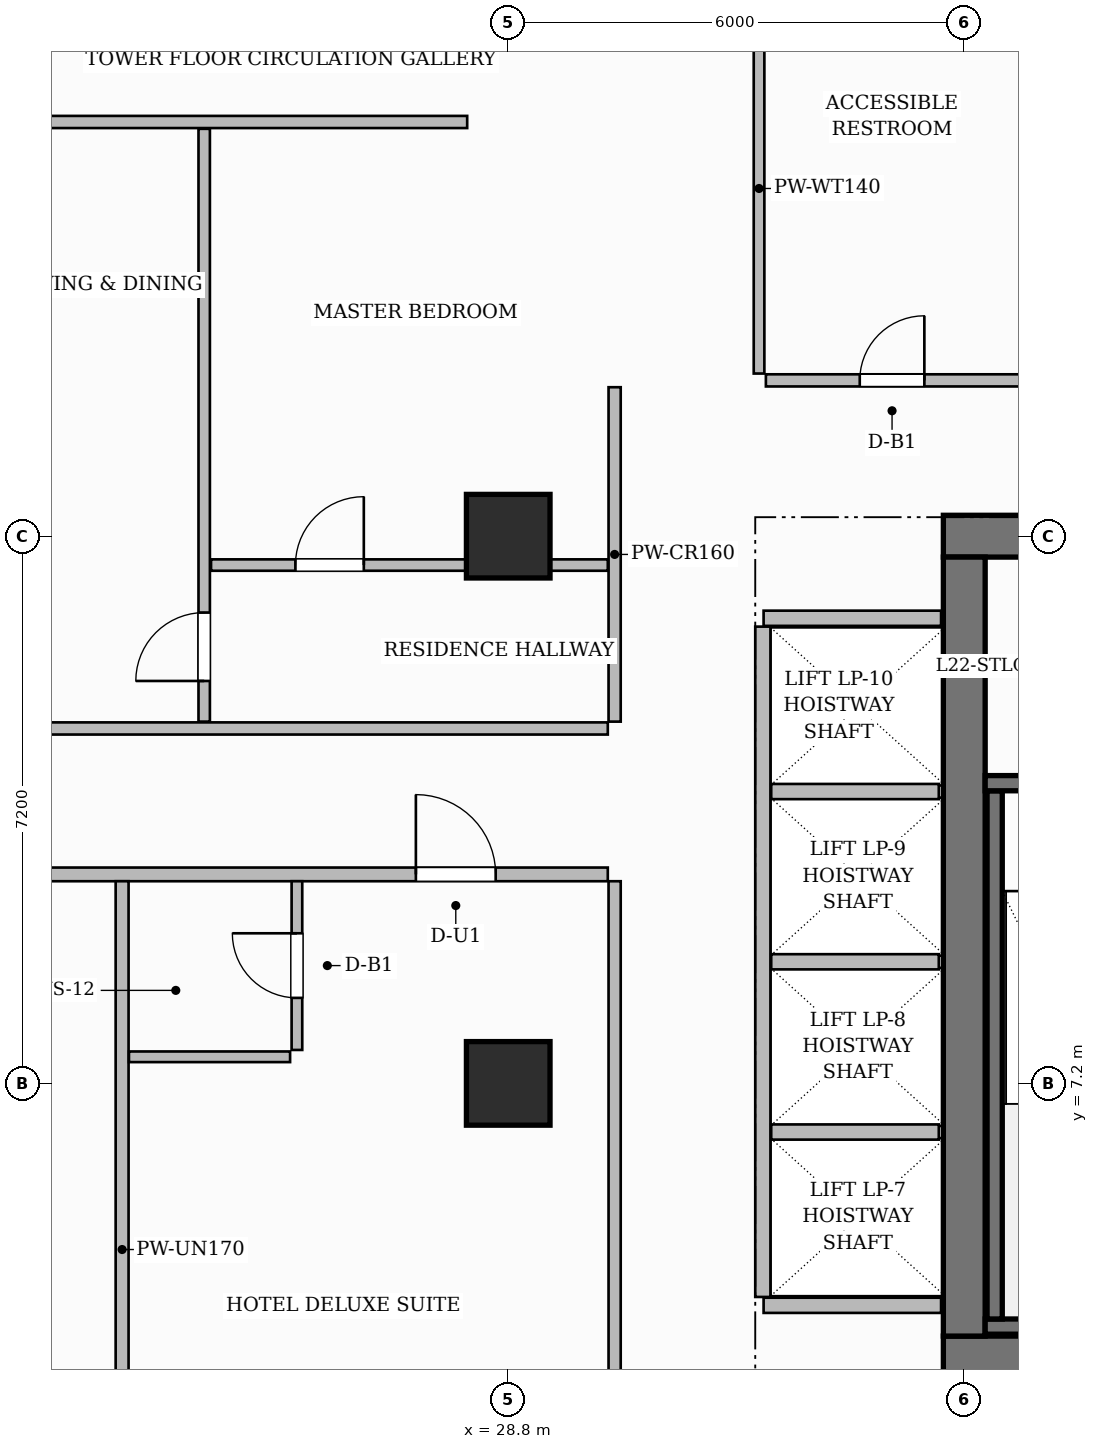
"""IFC4 building model, lengths in metres.
Left out: names, types, materials, properties, quantities, classifications, styles, units other than length and angle.
Written with IfcOpenShell. Run it as: python <this file> out.ifc"""

import sys

from ifc_helpers import new_model, si_unit, direction, frame, frame_2d, origin, origin_2d, place, context, subcontext, project, spatial, rectangle, extrude, source, transform, mapped, element, fill, save


model = new_model("IFC4")
c1 = context("Model", 3, precision=1e-05, world=origin(), true_north=direction((0.0, 1.0)))
c2 = subcontext(c1, "Body", "Model", "MODEL_VIEW")
j1 = project(units=[si_unit("LENGTHUNIT", "METRE"), si_unit("PLANEANGLEUNIT", "RADIAN")], contexts=[c1])
p1 = place(None, origin())
s1 = spatial("IfcSite", under=j1, at=p1, CompositionType="ELEMENT")
p2 = place(p1, origin())
s2 = spatial("IfcBuilding", under=s1, at=p2, CompositionType="ELEMENT")
p3 = place(p2, frame((0.0, 0.0, 91.6)))
s3 = spatial("IfcBuildingStorey", under=s2, at=p3, CompositionType="ELEMENT", Elevation=91.6)
p4 = place(p3, frame((34.525, 3.6, 0.0), z_axis=(0.0, 0.0, 1.0), x_axis=(1.0, 0.0, 0.0)))
e1 = element("IfcWall", 1, at=p4, inside=s3, PredefinedType="SHEAR", context=c2, shape_type="SweptSolid", body=[
    extrude(rectangle(XDim=15.55, YDim=0.55, at=frame_2d((7.775, 0.0))), origin(), (0.0, 0.0, 1.0), 3.7),
])
p5 = place(p4, frame((4.475, 0.0, 0.0)))
e2 = element("IfcOpeningElement", 2, at=p5, cuts=e1, PredefinedType="OPENING", context=c2, shape_type="SweptSolid", body=[
    extrude(rectangle(XDim=0.9, YDim=2.1, at=frame_2d((0.45, 1.05))), frame((0.0, 0.285, 0.0), z_axis=(0.0, -1.0, 0.0), x_axis=(1.0, 0.0, 0.0)), (0.0, 0.0, 1.0), 0.57),
])
p6 = place(p4, frame((6.925, 0.0, 0.0)))
e3 = element("IfcOpeningElement", 3, at=p6, cuts=e1, PredefinedType="OPENING", context=c2, shape_type="SweptSolid", body=[
    extrude(rectangle(XDim=0.9, YDim=2.1, at=frame_2d((0.45, 1.05))), frame((0.0, 0.285, 0.0), z_axis=(0.0, -1.0, 0.0), x_axis=(1.0, 0.0, 0.0)), (0.0, 0.0, 1.0), 0.57),
])
p7 = place(p3, frame((34.525, 14.4, 0.0), z_axis=(0.0, 0.0, 1.0), x_axis=(1.0, 0.0, 0.0)))
e4 = element("IfcWall", 4, at=p7, inside=s3, PredefinedType="SHEAR", context=c2, shape_type="SweptSolid", body=[
    extrude(rectangle(XDim=15.55, YDim=0.55, at=frame_2d((7.775, 0.0))), origin(), (0.0, 0.0, 1.0), 3.7),
])
p8 = place(p7, frame((5.405, 0.0, 0.0)))
e5 = element("IfcOpeningElement", 5, at=p8, cuts=e4, PredefinedType="OPENING", context=c2, shape_type="SweptSolid", body=[
    extrude(rectangle(XDim=1.5, YDim=2.2, at=frame_2d((0.75, 1.1))), frame((0.0, 0.285, 0.0), z_axis=(0.0, -1.0, 0.0), x_axis=(1.0, 0.0, 0.0)), (0.0, 0.0, 1.0), 0.57),
])
p9 = place(p7, frame((1.62, 0.0, 0.0)))
e6 = element("IfcOpeningElement", 6, at=p9, cuts=e4, PredefinedType="OPENING", context=c2, shape_type="SweptSolid", body=[
    extrude(rectangle(XDim=1.05, YDim=2.15, at=frame_2d((0.525, 1.075))), frame((0.0, 0.285, 0.0), z_axis=(0.0, -1.0, 0.0), x_axis=(1.0, 0.0, 0.0)), (0.0, 0.0, 1.0), 0.57),
])
p10 = place(p7, frame((11.25, 0.0, 0.0)))
e7 = element("IfcOpeningElement", 7, at=p10, cuts=e4, PredefinedType="OPENING", context=c2, shape_type="SweptSolid", body=[
    extrude(rectangle(XDim=1.05, YDim=2.15, at=frame_2d((0.525, 1.075))), frame((0.0, 0.285, 0.0), z_axis=(0.0, -1.0, 0.0), x_axis=(1.0, 0.0, 0.0)), (0.0, 0.0, 1.0), 0.57),
])
p11 = place(p3, frame((34.8, 3.875, 0.0), z_axis=(0.0, 0.0, 1.0), x_axis=(0.0, 1.0, 0.0)))
e8 = element("IfcWall", 8, at=p11, inside=s3, PredefinedType="SHEAR", context=c2, shape_type="SweptSolid", body=[
    extrude(rectangle(XDim=10.25, YDim=0.55, at=frame_2d((5.125, 0.0))), origin(), (0.0, 0.0, 1.0), 3.7),
])
m1 = source(origin(), c2, "Body", "SweptSolid", [
    extrude(rectangle(XDim=1.1, YDim=1.1, at=origin_2d()), origin(), (0.0, 0.0, 1.0), 3.7),
])
for number, where, z_axis, x_axis in (
    (9, (28.8, 7.2, 0.0), (0.0, 0.0, 1.0), (1.0, 0.0, 0.0)),
    (10, (28.8, 14.4, 0.0), (0.0, 0.0, 1.0), (1.0, 0.0, 0.0)),
):
    element("IfcColumn", number, at=place(p3, frame(where, z_axis=z_axis, x_axis=x_axis)), inside=s3, PredefinedType="COLUMN", context=c2, shape_type="MappedRepresentation", body=[
        mapped(m1, transform((0.0, 0.0, 0.0), scale=1.0)),
    ])
p12 = place(p3, frame((35.075, 4.0, 0.0), z_axis=(0.0, 0.0, 1.0), x_axis=(1.0, 0.0, 0.0)))
e11 = element("IfcWall", 11, at=p12, inside=s3, PredefinedType="SHEAR", context=c2, shape_type="SweptSolid", body=[
    extrude(rectangle(XDim=3.165, YDim=0.2, at=frame_2d((1.583, 0.0))), origin(), (0.0, 0.0, 1.0), 3.7),
])
p13 = place(p3, frame((35.2, 4.1, 0.0), z_axis=(0.0, 0.0, 1.0), x_axis=(0.0, 1.0, 0.0)))
e12 = element("IfcWall", 12, at=p13, inside=s3, PredefinedType="SHEAR", context=c2, shape_type="SweptSolid", body=[
    extrude(rectangle(XDim=6.95, YDim=0.2, at=frame_2d((3.475, 0.0))), origin(), (0.0, 0.0, 1.0), 3.7),
])
p14 = place(p3, frame((35.075, 11.15, 0.0), z_axis=(0.0, 0.0, 1.0), x_axis=(1.0, 0.0, 0.0)))
e13 = element("IfcWall", 13, at=p14, inside=s3, PredefinedType="SHEAR", context=c2, shape_type="SweptSolid", body=[
    extrude(rectangle(XDim=3.165, YDim=0.2, at=frame_2d((1.583, 0.0))), origin(), (0.0, 0.0, 1.0), 3.7),
])
p15 = place(p14, frame((1.07, 0.0, 0.0)))
e14 = element("IfcOpeningElement", 14, at=p15, cuts=e13, PredefinedType="OPENING", context=c2, shape_type="SweptSolid", body=[
    extrude(rectangle(XDim=1.05, YDim=2.2, at=frame_2d((0.525, 1.1))), frame((0.0, 0.11, 0.0), z_axis=(0.0, -1.0, 0.0), x_axis=(1.0, 0.0, 0.0)), (0.0, 0.0, 1.0), 0.22),
])
for number, where, z_axis, x_axis in (
    (15, (32.16, 4.28, 0.0), (0.0, 0.0, 1.0), (1.0, 0.0, 0.0)),
    (16, (32.16, 13.32, 0.0), (0.0, 0.0, 1.0), (1.0, 0.0, 0.0)),
):
    element("IfcWall", number, at=place(p3, frame(where, z_axis=z_axis, x_axis=x_axis)), inside=s3, PredefinedType="PARTITIONING", context=c2, shape_type="SweptSolid", body=[
        extrude(rectangle(XDim=2.335, YDim=0.2, at=frame_2d((1.167, 0.0))), origin(), (0.0, 0.0, 1.0), 3.45),
    ])
p16 = place(p3, frame((32.15, 4.39, 0.0), z_axis=(0.0, 0.0, 1.0), x_axis=(0.0, 1.0, 0.0)))
e17 = element("IfcWall", 17, at=p16, inside=s3, PredefinedType="PARTITIONING", context=c2, shape_type="SweptSolid", body=[
    extrude(rectangle(XDim=8.82, YDim=0.2, at=frame_2d((4.41, 0.0))), origin(), (0.0, 0.0, 1.0), 3.45),
])
for number, where, z_axis, x_axis in (
    (18, (32.26, 6.56, 0.0), (0.0, 0.0, 1.0), (1.0, 0.0, 0.0)),
    (19, (32.26, 8.8, 0.0), (0.0, 0.0, 1.0), (1.0, 0.0, 0.0)),
    (20, (32.26, 11.04, 0.0), (0.0, 0.0, 1.0), (1.0, 0.0, 0.0)),
):
    element("IfcWall", number, at=place(p3, frame(where, z_axis=z_axis, x_axis=x_axis)), inside=s3, PredefinedType="PARTITIONING", context=c2, shape_type="SweptSolid", body=[
        extrude(rectangle(XDim=2.205, YDim=0.2, at=frame_2d((1.103, 0.0))), origin(), (0.0, 0.0, 1.0), 3.45),
    ])
p17 = place(p3, frame((14.568, 9.95, 0.0), z_axis=(0.0, 0.0, 1.0), x_axis=(1.0, 0.0, 0.0)))
e21 = element("IfcWall", 21, at=p17, inside=s3, PredefinedType="PARTITIONING", context=c2, shape_type="SweptSolid", body=[
    extrude(rectangle(XDim=15.542, YDim=0.18, at=frame_2d((7.771, 0.0))), origin(), (0.0, 0.0, 1.0), 3.45),
])
p18 = place(p17, frame((5.142, 0.0, 0.0)))
e22 = element("IfcOpeningElement", 22, at=p18, cuts=e21, PredefinedType="OPENING", context=c2, shape_type="SweptSolid", body=[
    extrude(rectangle(XDim=1.0, YDim=2.2, at=frame_2d((0.5, 1.1))), frame((0.0, 0.1, 0.0), z_axis=(0.0, -1.0, 0.0), x_axis=(1.0, 0.0, 0.0)), (0.0, 0.0, 1.0), 0.2),
])
p19 = place(p17, frame((13.017, 0.0, 0.0)))
e23 = element("IfcOpeningElement", 23, at=p19, cuts=e21, PredefinedType="OPENING", context=c2, shape_type="SweptSolid", body=[
    extrude(rectangle(XDim=1.05, YDim=2.25, at=frame_2d((0.525, 1.125))), frame((0.0, 0.1, 0.0), z_axis=(0.0, -1.0, 0.0), x_axis=(1.0, 0.0, 0.0)), (0.0, 0.0, 1.0), 0.2),
])
p20 = place(p3, frame((14.568, 11.87, 0.0), z_axis=(0.0, 0.0, 1.0), x_axis=(1.0, 0.0, 0.0)))
e24 = element("IfcWall", 24, at=p20, inside=s3, PredefinedType="PARTITIONING", context=c2, shape_type="SweptSolid", body=[
    extrude(rectangle(XDim=15.542, YDim=0.16, at=frame_2d((7.771, 0.0))), origin(), (0.0, 0.0, 1.0), 3.45),
])
p21 = place(p20, frame((7.122, 0.0, 0.0)))
e25 = element("IfcOpeningElement", 25, at=p21, cuts=e24, PredefinedType="OPENING", context=c2, shape_type="SweptSolid", body=[
    extrude(rectangle(XDim=1.05, YDim=2.25, at=frame_2d((0.525, 1.125))), frame((0.0, 0.09, 0.0), z_axis=(0.0, -1.0, 0.0), x_axis=(1.0, 0.0, 0.0)), (0.0, 0.0, 1.0), 0.18),
])
p22 = place(p3, frame((30.2, 11.96, 0.0), z_axis=(0.0, 0.0, 1.0), x_axis=(0.0, 1.0, 0.0)))
e26 = element("IfcWall", 26, at=p22, inside=s3, PredefinedType="PARTITIONING", context=c2, shape_type="SweptSolid", body=[
    extrude(rectangle(XDim=4.4, YDim=0.16, at=frame_2d((2.2, 0.0))), origin(), (0.0, 0.0, 1.0), 3.45),
])
p23 = place(p3, frame((32.19, 16.45, 0.0), z_axis=(0.0, 0.0, 1.0), x_axis=(1.0, 0.0, 0.0)))
e27 = element("IfcWall", 27, at=p23, inside=s3, PredefinedType="PARTITIONING", context=c2, shape_type="SweptSolid", body=[
    extrude(rectangle(XDim=17.47, YDim=0.16, at=frame_2d((8.735, 0.0))), origin(), (0.0, 0.0, 1.0), 3.45),
])
p24 = place(p23, frame((1.235, 0.0, 0.0)))
e28 = element("IfcOpeningElement", 28, at=p24, cuts=e27, PredefinedType="OPENING", context=c2, shape_type="SweptSolid", body=[
    extrude(rectangle(XDim=0.85, YDim=2.1, at=frame_2d((0.425, 1.05))), frame((0.0, 0.09, 0.0), z_axis=(0.0, -1.0, 0.0), x_axis=(1.0, 0.0, 0.0)), (0.0, 0.0, 1.0), 0.18),
])
p25 = place(p23, frame((6.61, 0.0, 0.0)))
e29 = element("IfcOpeningElement", 29, at=p25, cuts=e27, PredefinedType="OPENING", context=c2, shape_type="SweptSolid", body=[
    extrude(rectangle(XDim=1.4, YDim=2.35, at=frame_2d((0.7, 1.175))), frame((0.0, 0.09, 0.0), z_axis=(0.0, -1.0, 0.0), x_axis=(1.0, 0.0, 0.0)), (0.0, 0.0, 1.0), 0.18),
])
p26 = place(p23, frame((13.885, 0.0, 0.0)))
e30 = element("IfcOpeningElement", 30, at=p26, cuts=e27, PredefinedType="OPENING", context=c2, shape_type="SweptSolid", body=[
    extrude(rectangle(XDim=0.95, YDim=2.15, at=frame_2d((0.475, 1.075))), frame((0.0, 0.09, 0.0), z_axis=(0.0, -1.0, 0.0), x_axis=(1.0, 0.0, 0.0)), (0.0, 0.0, 1.0), 0.18),
])
p27 = place(p3, frame((30.2, 0.168, 0.0), z_axis=(0.0, 0.0, 1.0), x_axis=(0.0, 1.0, 0.0)))
e31 = element("IfcWall", 31, at=p27, inside=s3, PredefinedType="PARTITIONING", context=c2, shape_type="SweptSolid", body=[
    extrude(rectangle(XDim=9.692, YDim=0.16, at=frame_2d((4.846, 0.0))), origin(), (0.0, 0.0, 1.0), 3.45),
])
p28 = place(p27, frame((1.957, 0.0, 0.0)))
e32 = element("IfcOpeningElement", 32, at=p28, cuts=e31, PredefinedType="OPENING", context=c2, shape_type="SweptSolid", body=[
    extrude(rectangle(XDim=1.05, YDim=2.15, at=frame_2d((0.525, 1.075))), frame((0.0, 0.09, 0.0), z_axis=(0.0, -1.0, 0.0), x_axis=(1.0, 0.0, 0.0)), (0.0, 0.0, 1.0), 0.18),
])
p29 = place(p3, frame((32.1, 16.54, 0.0), z_axis=(0.0, 0.0, 1.0), x_axis=(0.0, 1.0, 0.0)))
e33 = element("IfcWall", 33, at=p29, inside=s3, PredefinedType="PARTITIONING", context=c2, shape_type="SweptSolid", body=[
    extrude(rectangle(XDim=4.87, YDim=0.14, at=frame_2d((2.435, 0.0))), origin(), (0.0, 0.0, 1.0), 3.45),
])
p30 = place(p3, frame((23.72, 0.168, 0.0), z_axis=(0.0, 0.0, 1.0), x_axis=(0.0, 1.0, 0.0)))
e34 = element("IfcWall", 34, at=p30, inside=s3, PredefinedType="PARTITIONING", context=c2, shape_type="SweptSolid", body=[
    extrude(rectangle(XDim=9.692, YDim=0.17, at=frame_2d((4.846, 0.0))), origin(), (0.0, 0.0, 1.0), 3.45),
])
p31 = place(p3, frame((26.02, 7.64, 0.0), z_axis=(0.0, 0.0, 1.0), x_axis=(0.0, 1.0, 0.0)))
e35 = element("IfcWall", 35, at=p31, inside=s3, PredefinedType="PARTITIONING", context=c2, shape_type="SweptSolid", body=[
    extrude(rectangle(XDim=2.22, YDim=0.14, at=frame_2d((1.11, 0.0))), origin(), (0.0, 0.0, 1.0), 3.45),
])
p32 = place(p31, frame((0.685, 0.0, 0.0)))
e36 = element("IfcOpeningElement", 36, at=p32, cuts=e35, PredefinedType="OPENING", context=c2, shape_type="SweptSolid", body=[
    extrude(rectangle(XDim=0.85, YDim=2.1, at=frame_2d((0.425, 1.05))), frame((0.0, 0.08, 0.0), z_axis=(0.0, -1.0, 0.0), x_axis=(1.0, 0.0, 0.0)), (0.0, 0.0, 1.0), 0.16),
])
p33 = place(p3, frame((23.81, 7.55, 0.0), z_axis=(0.0, 0.0, 1.0), x_axis=(1.0, 0.0, 0.0)))
e37 = element("IfcWall", 37, at=p33, inside=s3, PredefinedType="PARTITIONING", context=c2, shape_type="SweptSolid", body=[
    extrude(rectangle(XDim=2.12, YDim=0.14, at=frame_2d((1.06, 0.0))), origin(), (0.0, 0.0, 1.0), 3.45),
])
p34 = place(p3, frame((17.34, 19.85, 0.0), z_axis=(0.0, 0.0, 1.0), x_axis=(1.0, 0.0, 0.0)))
e38 = element("IfcWall", 38, at=p34, inside=s3, PredefinedType="PARTITIONING", context=c2, shape_type="SweptSolid", body=[
    extrude(rectangle(XDim=10.92, YDim=0.16, at=frame_2d((5.46, 0.0))), origin(), (0.0, 0.0, 1.0), 3.45),
])
p35 = place(p3, frame((24.8, 11.96, 0.0), z_axis=(0.0, 0.0, 1.0), x_axis=(0.0, 1.0, 0.0)))
e39 = element("IfcWall", 39, at=p35, inside=s3, PredefinedType="PARTITIONING", context=c2, shape_type="SweptSolid", body=[
    extrude(rectangle(XDim=7.8, YDim=0.15, at=frame_2d((3.9, 0.0))), origin(), (0.0, 0.0, 1.0), 3.45),
])
p36 = place(p35, frame((0.535, 0.0, 0.0)))
e40 = element("IfcOpeningElement", 40, at=p36, cuts=e39, PredefinedType="OPENING", context=c2, shape_type="SweptSolid", body=[
    extrude(rectangle(XDim=0.9, YDim=2.15, at=frame_2d((0.45, 1.075))), frame((0.0, 0.085, 0.0), z_axis=(0.0, -1.0, 0.0), x_axis=(1.0, 0.0, 0.0)), (0.0, 0.0, 1.0), 0.17),
])
p37 = place(p3, frame((24.89, 14.02, 0.0), z_axis=(0.0, 0.0, 1.0), x_axis=(1.0, 0.0, 0.0)))
e41 = element("IfcWall", 41, at=p37, inside=s3, PredefinedType="PARTITIONING", context=c2, shape_type="SweptSolid", body=[
    extrude(rectangle(XDim=5.22, YDim=0.15, at=frame_2d((2.61, 0.0))), origin(), (0.0, 0.0, 1.0), 3.45),
])
p38 = place(p37, frame((1.11, 0.0, 0.0)))
e42 = element("IfcOpeningElement", 42, at=p38, cuts=e41, PredefinedType="OPENING", context=c2, shape_type="SweptSolid", body=[
    extrude(rectangle(XDim=0.9, YDim=2.15, at=frame_2d((0.45, 1.075))), frame((0.0, 0.085, 0.0), z_axis=(0.0, -1.0, 0.0), x_axis=(1.0, 0.0, 0.0)), (0.0, 0.0, 1.0), 0.17),
])
m2 = source(origin(), c2, "Body", "SweptSolid", [
    extrude(rectangle(XDim=0.85, YDim=2.1, at=frame_2d((0.425, 1.05))), frame((0.0, 0.025, 0.0), z_axis=(0.0, -1.0, 0.0), x_axis=(1.0, 0.0, 0.0)), (0.0, 0.0, 1.0), 0.05),
])
p39 = place(p24, origin())
e43 = element("IfcDoor", 43, at=p39, inside=s3, OperationType="SINGLE_SWING_RIGHT", PredefinedType="DOOR", context=c2, shape_type="MappedRepresentation", body=[
    mapped(m2, transform((0.0, 0.0, 0.0), scale=1.0)),
])
fill(e28, e43)
p40 = place(p32, origin())
e44 = element("IfcDoor", 44, at=p40, inside=s3, OperationType="SINGLE_SWING_RIGHT", PredefinedType="DOOR", context=c2, shape_type="MappedRepresentation", body=[
    mapped(m2, transform((0.0, 0.0, 0.0), scale=1.0)),
])
fill(e36, e44)
m3 = source(origin(), c2, "Body", "SweptSolid", [
    extrude(rectangle(XDim=1.05, YDim=2.25, at=frame_2d((0.525, 1.125))), frame((0.0, 0.025, 0.0), z_axis=(0.0, -1.0, 0.0), x_axis=(1.0, 0.0, 0.0)), (0.0, 0.0, 1.0), 0.05),
])
p41 = place(p19, origin())
e45 = element("IfcDoor", 45, at=p41, inside=s3, OperationType="SINGLE_SWING_LEFT", PredefinedType="DOOR", context=c2, shape_type="MappedRepresentation", body=[
    mapped(m3, transform((0.0, 0.0, 0.0), scale=1.0)),
])
fill(e23, e45)
m4 = source(origin(), c2, "Body", "SweptSolid", [
    extrude(rectangle(XDim=0.9, YDim=2.15, at=frame_2d((0.45, 1.075))), frame((0.0, 0.025, 0.0), z_axis=(0.0, -1.0, 0.0), x_axis=(1.0, 0.0, 0.0)), (0.0, 0.0, 1.0), 0.05),
])
p42 = place(p36, origin())
e46 = element("IfcDoor", 46, at=p42, inside=s3, OperationType="SINGLE_SWING_LEFT", PredefinedType="DOOR", context=c2, shape_type="MappedRepresentation", body=[
    mapped(m4, transform((0.0, 0.0, 0.0), scale=1.0)),
])
fill(e40, e46)
p43 = place(p38, origin())
e47 = element("IfcDoor", 47, at=p43, inside=s3, OperationType="SINGLE_SWING_RIGHT", PredefinedType="DOOR", context=c2, shape_type="MappedRepresentation", body=[
    mapped(m4, transform((0.0, 0.0, 0.0), scale=1.0)),
])
fill(e42, e47)
save(model, sys.argv[1])
